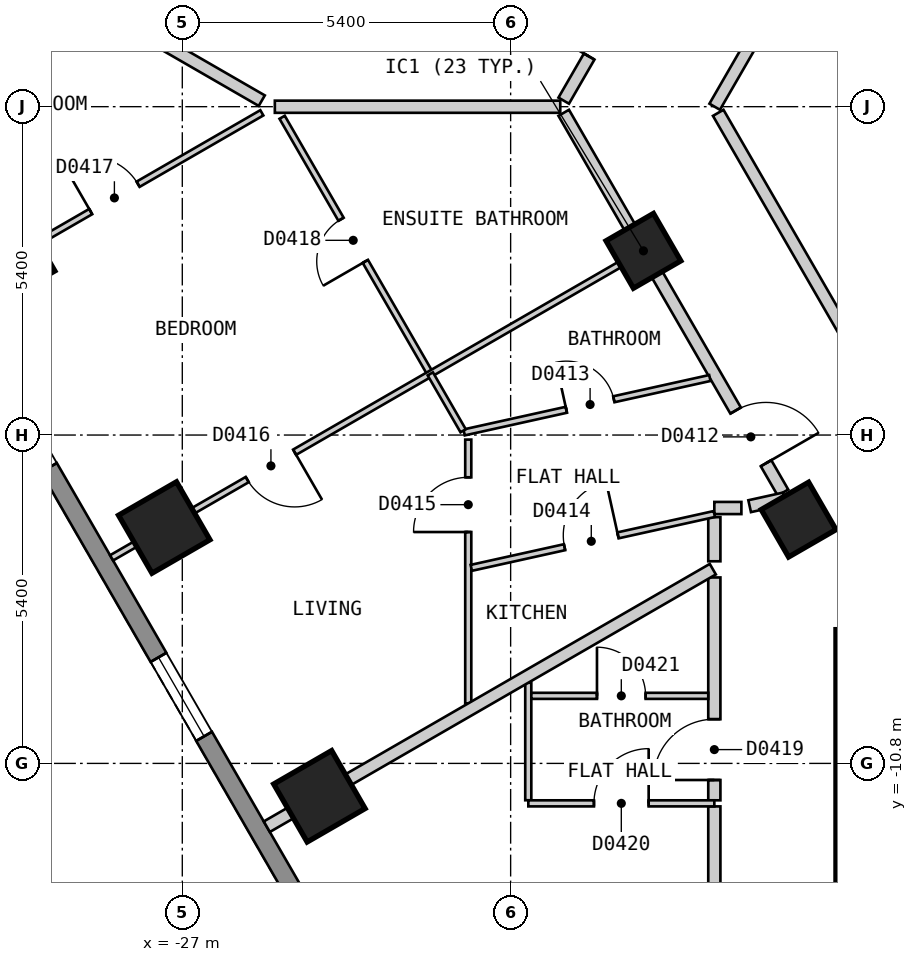
"""IFC4 building model, lengths in metres.
Left out: names, types, materials, properties, quantities, classifications, styles, units other than length and angle.
Written with IfcOpenShell. Run it as: python <this file> out.ifc"""

import sys

from ifc_helpers import new_model, si_unit, direction, frame, frame_2d, origin, origin_2d, place, context, subcontext, project, spatial, polyline, rectangle, outline, extrude, element, fill, save


model = new_model("IFC4")
c1 = context("Model", 3, precision=1e-05, world=origin(), true_north=direction((0.0, 1.0)))
c2 = subcontext(c1, "Body", "Model", "MODEL_VIEW")
j1 = project(units=[si_unit("LENGTHUNIT", "METRE"), si_unit("PLANEANGLEUNIT", "RADIAN")], contexts=[c1])
p1 = place(None, origin())
s1 = spatial("IfcSite", under=j1, at=p1, CompositionType="ELEMENT")
p2 = place(p1, origin())
s2 = spatial("IfcBuilding", under=s1, at=p2, CompositionType="ELEMENT")
p3 = place(p2, frame((0.0, 0.0, 38.4)))
s3 = spatial("IfcBuildingStorey", under=s2, at=p3, CompositionType="ELEMENT", Elevation=38.4)
for number, where, z_axis, x_axis in (
    (1, (-29.848, -2.5, 0.0), (0.0, 0.0, 1.0), (0.5, -0.866, 0.0)),
    (2, (-27.297, -6.921, 0.0), (0.0, 0.0, 1.0), (0.5, -0.866, 0.0)),
    (3, (-24.745, -11.341, 0.0), (0.0, 0.0, 1.0), (0.5, -0.866, 0.0)),
):
    element("IfcColumn", number, at=place(p3, frame(where, z_axis=z_axis, x_axis=x_axis)), inside=s3, PredefinedType="COLUMN", context=c2, shape_type="SweptSolid", body=[
        extrude(rectangle(XDim=1.1, YDim=1.1, at=origin_2d()), origin(), (0.0, 0.0, 1.0), 3.0),
    ])
for number, where, z_axis, x_axis in (
    (4, (-19.416, -2.371, 0.0), (0.0, 0.0, 1.0), (0.5, -0.866, 0.0)),
    (5, (-16.864, -6.791, 0.0), (0.0, 0.0, 1.0), (0.5, -0.866, 0.0)),
):
    element("IfcColumn", number, at=place(p3, frame(where, z_axis=z_axis, x_axis=x_axis)), inside=s3, PredefinedType="COLUMN", context=c2, shape_type="SweptSolid", body=[
        extrude(rectangle(XDim=0.9, YDim=0.9, at=origin_2d()), origin(), (0.0, 0.0, 1.0), 3.0),
    ])
p4 = place(p3, frame((-31.22, -2.425, 0.0), z_axis=(0.0, 0.0, 1.0), x_axis=(0.500001938803, -0.866024284413, 0.0)))
e6 = element("IfcWall", 6, at=p4, inside=s3, PredefinedType="SOLIDWALL", context=c2, shape_type="SweptSolid", body=[
    extrude(outline(polyline([(0.0, -0.15), (27.02, -0.15), (26.94, 0.15), (0.08, 0.15), (0.0, -0.15)])), origin(), (0.0, 0.0, 1.0), 2.7),
])
p5 = place(p4, frame((2.553, 0.0, 0.15)))
e7 = element("IfcOpeningElement", 7, at=p5, cuts=e6, PredefinedType="OPENING", context=c2, shape_type="SweptSolid", body=[
    extrude(rectangle(XDim=1.5, YDim=2.1, at=frame_2d((0.75, 1.05))), frame((0.0, 0.16, 0.0), z_axis=(0.0, -1.0, 0.0), x_axis=(1.0, 0.0, 0.0)), (0.0, 0.0, 1.0), 0.32),
])
p6 = place(p4, frame((7.657, 0.0, 0.15)))
e8 = element("IfcOpeningElement", 8, at=p6, cuts=e6, PredefinedType="OPENING", context=c2, shape_type="SweptSolid", body=[
    extrude(rectangle(XDim=1.5, YDim=2.1, at=frame_2d((0.75, 1.05))), frame((0.0, 0.16, 0.0), z_axis=(0.0, -1.0, 0.0), x_axis=(1.0, 0.0, 0.0)), (0.0, 0.0, 1.0), 0.32),
])
p7 = place(p4, frame((12.761, 0.0, 0.15)))
e9 = element("IfcOpeningElement", 9, at=p7, cuts=e6, PredefinedType="OPENING", context=c2, shape_type="SweptSolid", body=[
    extrude(rectangle(XDim=1.5, YDim=2.1, at=frame_2d((0.75, 1.05))), frame((0.0, 0.16, 0.0), z_axis=(0.0, -1.0, 0.0), x_axis=(1.0, 0.0, 0.0)), (0.0, 0.0, 1.0), 0.32),
])
p8 = place(p4, frame((17.865, 0.0, 0.15)))
e10 = element("IfcOpeningElement", 10, at=p8, cuts=e6, PredefinedType="OPENING", context=c2, shape_type="SweptSolid", body=[
    extrude(rectangle(XDim=1.5, YDim=2.1, at=frame_2d((0.75, 1.05))), frame((0.0, 0.16, 0.0), z_axis=(0.0, -1.0, 0.0), x_axis=(1.0, 0.0, 0.0)), (0.0, 0.0, 1.0), 0.32),
])
p9 = place(p4, frame((22.969, 0.0, 0.15)))
e11 = element("IfcOpeningElement", 11, at=p9, cuts=e6, PredefinedType="OPENING", context=c2, shape_type="SweptSolid", body=[
    extrude(rectangle(XDim=1.5, YDim=2.1, at=frame_2d((0.75, 1.05))), frame((0.0, 0.16, 0.0), z_axis=(0.0, -1.0, 0.0), x_axis=(1.0, 0.0, 0.0)), (0.0, 0.0, 1.0), 0.32),
])
p10 = place(p3, frame((-18.186, -0.101, 0.0), z_axis=(0.0, 0.0, 1.0), x_axis=(0.499997591167, -0.86602679452, 0.0)))
e12 = element("IfcWall", 12, at=p10, inside=s3, PredefinedType="PARTITIONING", context=c2, shape_type="SweptSolid", body=[
    extrude(rectangle(XDim=5.172, YDim=0.2, at=frame_2d((2.586, 0.0))), origin(), (0.0, 0.0, 1.0), 2.7),
])
p11 = place(p3, frame((-20.727, -0.101, 0.0), z_axis=(0.0, 0.0, 1.0), x_axis=(0.500049702773, -0.865996705973, 0.0)))
e13 = element("IfcWall", 13, at=p11, inside=s3, PredefinedType="PARTITIONING", context=c2, shape_type="SweptSolid", body=[
    extrude(rectangle(XDim=7.211, YDim=0.2, at=frame_2d((3.605, 0.0))), origin(), (0.0, 0.0, 1.0), 2.7),
])
p12 = place(p11, frame((5.654, 0.0, 0.0)))
e14 = element("IfcOpeningElement", 14, at=p12, cuts=e13, PredefinedType="OPENING", context=c2, shape_type="SweptSolid", body=[
    extrude(rectangle(XDim=1.0, YDim=2.1, at=frame_2d((0.5, 1.05))), frame((0.0, 0.11, 0.0), z_axis=(0.0, -1.0, 0.0), x_axis=(1.0, 0.0, 0.0)), (0.0, 0.0, 1.0), 0.22),
])
p13 = place(p3, frame((-18.25, -11.507, 0.0), z_axis=(0.0, 0.0, 1.0), x_axis=(0.0, -1.0, 0.0)))
e15 = element("IfcWall", 15, at=p13, inside=s3, PredefinedType="PARTITIONING", context=c2, shape_type="SweptSolid", body=[
    extrude(rectangle(XDim=4.792, YDim=0.2, at=frame_2d((2.396, 0.0))), origin(), (0.0, 0.0, 1.0), 2.7),
])
p14 = place(p3, frame((-18.25, -6.6, 0.0), z_axis=(0.0, 0.0, 1.0), x_axis=(1.0, 0.0, 0.0)))
e16 = element("IfcWall", 16, at=p14, inside=s3, PredefinedType="PARTITIONING", context=c2, shape_type="SweptSolid", body=[
    extrude(rectangle(XDim=0.445, YDim=0.2, at=frame_2d((0.223, 0.0))), origin(), (0.0, 0.0, 1.0), 2.7),
])
p15 = place(p3, frame((-18.244, -0.001, 0.0), z_axis=(0.0, 0.0, 1.0), x_axis=(0.499962999376, 0.866046765051, 0.0)))
e17 = element("IfcWall", 17, at=p15, inside=s3, PredefinedType="PARTITIONING", context=c2, shape_type="SweptSolid", body=[
    extrude(rectangle(XDim=18.245, YDim=0.2, at=frame_2d((9.123, 0.0))), origin(), (0.0, 0.0, 1.0), 2.7),
])
p16 = place(p15, frame((8.672, 0.0, 0.0)))
e18 = element("IfcOpeningElement", 18, at=p16, cuts=e17, PredefinedType="OPENING", context=c2, shape_type="SweptSolid", body=[
    extrude(rectangle(XDim=0.9, YDim=2.1, at=frame_2d((0.45, 1.05))), frame((0.0, 0.11, 0.0), z_axis=(0.0, -1.0, 0.0), x_axis=(1.0, 0.0, 0.0)), (0.0, 0.0, 1.0), 0.22),
])
p17 = place(p3, frame((-20.727, 0.099, 0.0), z_axis=(0.0, 0.0, 1.0), x_axis=(0.499993204491, 0.866029327138, 0.0)))
e19 = element("IfcWall", 19, at=p17, inside=s3, PredefinedType="PARTITIONING", context=c2, shape_type="SweptSolid", body=[
    extrude(rectangle(XDim=20.554, YDim=0.2, at=frame_2d((10.277, 0.0))), origin(), (0.0, 0.0, 1.0), 2.7),
])
p18 = place(p17, frame((18.916, 0.0, 0.0)))
e20 = element("IfcOpeningElement", 20, at=p18, cuts=e19, PredefinedType="OPENING", context=c2, shape_type="SweptSolid", body=[
    extrude(rectangle(XDim=0.8, YDim=2.1, at=frame_2d((0.4, 1.05))), frame((0.0, 0.11, 0.0), z_axis=(0.0, -1.0, 0.0), x_axis=(1.0, 0.0, 0.0)), (0.0, 0.0, 1.0), 0.22),
])
p19 = place(p17, frame((14.88, 0.0, 0.0)))
e21 = element("IfcOpeningElement", 21, at=p19, cuts=e19, PredefinedType="OPENING", context=c2, shape_type="SweptSolid", body=[
    extrude(rectangle(XDim=1.0, YDim=2.1, at=frame_2d((0.5, 1.05))), frame((0.0, 0.11, 0.0), z_axis=(0.0, -1.0, 0.0), x_axis=(1.0, 0.0, 0.0)), (0.0, 0.0, 1.0), 0.22),
])
p20 = place(p17, frame((9.776, 0.0, 0.0)))
e22 = element("IfcOpeningElement", 22, at=p20, cuts=e19, PredefinedType="OPENING", context=c2, shape_type="SweptSolid", body=[
    extrude(rectangle(XDim=1.0, YDim=2.1, at=frame_2d((0.5, 1.05))), frame((0.0, 0.11, 0.0), z_axis=(0.0, -1.0, 0.0), x_axis=(1.0, 0.0, 0.0)), (0.0, 0.0, 1.0), 0.22),
])
p21 = place(p17, frame((4.673, 0.0, 0.0)))
e23 = element("IfcOpeningElement", 23, at=p21, cuts=e19, PredefinedType="OPENING", context=c2, shape_type="SweptSolid", body=[
    extrude(rectangle(XDim=1.0, YDim=2.1, at=frame_2d((0.5, 1.05))), frame((0.0, 0.11, 0.0), z_axis=(0.0, -1.0, 0.0), x_axis=(1.0, 0.0, 0.0)), (0.0, 0.0, 1.0), 0.22),
])
p22 = place(p17, frame((0.838, 0.0, 0.0)))
e24 = element("IfcOpeningElement", 24, at=p22, cuts=e19, PredefinedType="OPENING", context=c2, shape_type="SweptSolid", body=[
    extrude(rectangle(XDim=0.8, YDim=2.1, at=frame_2d((0.4, 1.05))), frame((0.0, 0.11, 0.0), z_axis=(0.0, -1.0, 0.0), x_axis=(1.0, 0.0, 0.0)), (0.0, 0.0, 1.0), 0.22),
])
p23 = place(p3, frame((-18.25, -11.407, 0.0), z_axis=(0.0, 0.0, 1.0), x_axis=(0.0, 1.0, 0.0)))
e25 = element("IfcWall", 25, at=p23, inside=s3, PredefinedType="PARTITIONING", context=c2, shape_type="SweptSolid", body=[
    extrude(rectangle(XDim=3.665, YDim=0.2, at=frame_2d((1.833, 0.0))), origin(), (0.0, 0.0, 1.0), 2.7),
])
p24 = place(p23, frame((0.334, 0.0, 0.0)))
e26 = element("IfcOpeningElement", 26, at=p24, cuts=e25, PredefinedType="OPENING", context=c2, shape_type="SweptSolid", body=[
    extrude(rectangle(XDim=1.0, YDim=2.1, at=frame_2d((0.5, 1.05))), frame((0.0, 0.11, 0.0), z_axis=(0.0, -1.0, 0.0), x_axis=(1.0, 0.0, 0.0)), (0.0, 0.0, 1.0), 0.22),
])
p25 = place(p3, frame((-18.25, -7.476, 0.0), z_axis=(0.0, 0.0, 1.0), x_axis=(0.0, 1.0, 0.0)))
e27 = element("IfcWall", 27, at=p25, inside=s3, PredefinedType="PARTITIONING", context=c2, shape_type="SweptSolid", body=[
    extrude(rectangle(XDim=0.726, YDim=0.2, at=frame_2d((0.363, 0.0))), origin(), (0.0, 0.0, 1.0), 2.7),
])
p26 = place(p3, frame((-25.358, -0.174, 0.0), z_axis=(0.0, 0.0, 1.0), x_axis=(0.500093956194, -0.865971151354, 0.0)))
e28 = element("IfcWall", 28, at=p26, inside=s3, PredefinedType="PARTITIONING", context=c2, shape_type="SweptSolid", body=[
    extrude(rectangle(XDim=4.873, YDim=0.1, at=frame_2d((2.437, 0.0))), origin(), (0.0, 0.0, 1.0), 2.7),
])
p27 = place(p26, frame((1.937, 0.0, 0.0)))
e29 = element("IfcOpeningElement", 29, at=p27, cuts=e28, PredefinedType="OPENING", context=c2, shape_type="SweptSolid", body=[
    extrude(rectangle(XDim=0.8, YDim=2.1, at=frame_2d((0.4, 1.05))), frame((0.0, 0.06, 0.0), z_axis=(0.0, -1.0, 0.0), x_axis=(1.0, 0.0, 0.0)), (0.0, 0.0, 1.0), 0.12),
])
p28 = place(p3, frame((-21.31, -9.474, 0.0), z_axis=(0.0, 0.0, 1.0), x_axis=(0.0, -1.0, 0.0)))
e30 = element("IfcWall", 30, at=p28, inside=s3, PredefinedType="PARTITIONING", context=c2, shape_type="SweptSolid", body=[
    extrude(rectangle(XDim=1.932, YDim=0.1, at=frame_2d((0.966, 0.0))), origin(), (0.0, 0.0, 1.0), 2.7),
])
p29 = place(p3, frame((-21.26, -9.689, 0.0), z_axis=(0.0, 0.0, 1.0), x_axis=(1.0, 0.0, 0.0)))
e31 = element("IfcWall", 31, at=p29, inside=s3, PredefinedType="PARTITIONING", context=c2, shape_type="SweptSolid", body=[
    extrude(rectangle(XDim=2.91, YDim=0.1, at=frame_2d((1.455, 0.0))), origin(), (0.0, 0.0, 1.0), 2.7),
])
p30 = place(p29, frame((1.08, 0.0, 0.0)))
e32 = element("IfcOpeningElement", 32, at=p30, cuts=e31, PredefinedType="OPENING", context=c2, shape_type="SweptSolid", body=[
    extrude(rectangle(XDim=0.8, YDim=2.1, at=frame_2d((0.4, 1.05))), frame((0.0, 0.06, 0.0), z_axis=(0.0, -1.0, 0.0), x_axis=(1.0, 0.0, 0.0)), (0.0, 0.0, 1.0), 0.12),
])
p31 = place(p3, frame((-21.309, -11.457, 0.0), z_axis=(0.0, 0.0, 1.0), x_axis=(1.0, 0.0, 0.0)))
e33 = element("IfcWall", 33, at=p31, inside=s3, PredefinedType="PARTITIONING", context=c2, shape_type="SweptSolid", body=[
    extrude(rectangle(XDim=3.059, YDim=0.1, at=frame_2d((1.53, 0.0))), origin(), (0.0, 0.0, 1.0), 2.7),
])
p32 = place(p31, frame((1.079, 0.0, 0.0)))
e34 = element("IfcOpeningElement", 34, at=p32, cuts=e33, PredefinedType="OPENING", context=c2, shape_type="SweptSolid", body=[
    extrude(rectangle(XDim=0.9, YDim=2.1, at=frame_2d((0.45, 1.05))), frame((0.0, 0.06, 0.0), z_axis=(0.0, -1.0, 0.0), x_axis=(1.0, 0.0, 0.0)), (0.0, 0.0, 1.0), 0.12),
])
p33 = place(p3, frame((-22.297, -9.813, 0.0), z_axis=(0.0, 0.0, 1.0), x_axis=(0.0, 1.0, 0.0)))
e35 = element("IfcWall", 35, at=p33, inside=s3, PredefinedType="PARTITIONING", context=c2, shape_type="SweptSolid", body=[
    extrude(rectangle(XDim=4.338, YDim=0.1, at=frame_2d((2.169, 0.0))), origin(), (0.0, 0.0, 1.0), 2.7),
])
p34 = place(p33, frame((2.818, 0.0, 0.0)))
e36 = element("IfcOpeningElement", 36, at=p34, cuts=e35, PredefinedType="OPENING", context=c2, shape_type="SweptSolid", body=[
    extrude(rectangle(XDim=0.9, YDim=2.1, at=frame_2d((0.45, 1.05))), frame((0.0, 0.06, 0.0), z_axis=(0.0, -1.0, 0.0), x_axis=(1.0, 0.0, 0.0)), (0.0, 0.0, 1.0), 0.12),
])
p35 = place(p3, frame((-22.365, -5.357, 0.0), z_axis=(0.0, 0.0, 1.0), x_axis=(0.976339488582, 0.216243388421, 0.0)))
e37 = element("IfcWall", 37, at=p35, inside=s3, PredefinedType="PARTITIONING", context=c2, shape_type="SweptSolid", body=[
    extrude(rectangle(XDim=4.139, YDim=0.1, at=frame_2d((2.069, 0.0))), origin(), (0.0, 0.0, 1.0), 2.7),
])
p36 = place(p35, frame((1.722, 0.0, 0.0)))
e38 = element("IfcOpeningElement", 38, at=p36, cuts=e37, PredefinedType="OPENING", context=c2, shape_type="SweptSolid", body=[
    extrude(rectangle(XDim=0.8, YDim=2.1, at=frame_2d((0.4, 1.05))), frame((0.0, 0.06, 0.0), z_axis=(0.0, -1.0, 0.0), x_axis=(1.0, 0.0, 0.0)), (0.0, 0.0, 1.0), 0.12),
])
p37 = place(p3, frame((-22.247, -7.584, 0.0), z_axis=(0.0, 0.0, 1.0), x_axis=(0.97635375062, 0.216178985219, 0.0)))
e39 = element("IfcWall", 39, at=p37, inside=s3, PredefinedType="PARTITIONING", context=c2, shape_type="SweptSolid", body=[
    extrude(rectangle(XDim=4.094, YDim=0.1, at=frame_2d((2.047, 0.0))), origin(), (0.0, 0.0, 1.0), 2.7),
])
p38 = place(p37, frame((1.571, 0.0, 0.0)))
e40 = element("IfcOpeningElement", 40, at=p38, cuts=e39, PredefinedType="OPENING", context=c2, shape_type="SweptSolid", body=[
    extrude(rectangle(XDim=0.9, YDim=2.1, at=frame_2d((0.45, 1.05))), frame((0.0, 0.06, 0.0), z_axis=(0.0, -1.0, 0.0), x_axis=(1.0, 0.0, 0.0)), (0.0, 0.0, 1.0), 0.12),
])
p39 = place(p3, frame((-28.163, -7.42, 0.0), z_axis=(0.0, 0.0, 1.0), x_axis=(0.866065245018, 0.499930986609, 0.0)))
e41 = element("IfcWall", 41, at=p39, inside=s3, PredefinedType="PARTITIONING", context=c2, shape_type="SweptSolid", body=[
    extrude(rectangle(XDim=10.0, YDim=0.1, at=frame_2d((5.0, 0.0))), origin(), (0.0, 0.0, 1.0), 2.7),
])
p40 = place(p39, frame((2.576, 0.0, 0.0)))
e42 = element("IfcOpeningElement", 42, at=p40, cuts=e41, PredefinedType="OPENING", context=c2, shape_type="SweptSolid", body=[
    extrude(rectangle(XDim=0.9, YDim=2.1, at=frame_2d((0.45, 1.05))), frame((0.0, 0.06, 0.0), z_axis=(0.0, -1.0, 0.0), x_axis=(1.0, 0.0, 0.0)), (0.0, 0.0, 1.0), 0.12),
])
p41 = place(p3, frame((-30.715, -3.0, 0.0), z_axis=(0.0, 0.0, 1.0), x_axis=(0.866116197112, 0.49984270836, 0.0)))
e43 = element("IfcWall", 43, at=p41, inside=s3, PredefinedType="PARTITIONING", context=c2, shape_type="SweptSolid", body=[
    extrude(rectangle(XDim=5.8, YDim=0.1, at=frame_2d((2.9, 0.0))), origin(), (0.0, 0.0, 1.0), 2.7),
])
p42 = place(p41, frame((2.55, 0.0, 0.0)))
e44 = element("IfcOpeningElement", 44, at=p42, cuts=e43, PredefinedType="OPENING", context=c2, shape_type="SweptSolid", body=[
    extrude(rectangle(XDim=0.9, YDim=2.1, at=frame_2d((0.45, 1.05))), frame((0.0, 0.06, 0.0), z_axis=(0.0, -1.0, 0.0), x_axis=(1.0, 0.0, 0.0)), (0.0, 0.0, 1.0), 0.12),
])
p43 = place(p3, frame((-30.716, 2.999, 0.0), z_axis=(0.0, 0.0, 1.0), x_axis=(0.866032775405, -0.499987231761, 0.0)))
e45 = element("IfcWall", 45, at=p43, inside=s3, PredefinedType="PARTITIONING", context=c2, shape_type="SweptSolid", body=[
    extrude(rectangle(XDim=5.8, YDim=0.2, at=frame_2d((2.9, 0.0))), origin(), (0.0, 0.0, 1.0), 2.7),
])
p44 = place(p3, frame((-25.478, -0.001, 0.0), z_axis=(0.0, 0.0, 1.0), x_axis=(1.0, 0.0, 0.0)))
e46 = element("IfcWall", 46, at=p44, inside=s3, PredefinedType="PARTITIONING", context=c2, shape_type="SweptSolid", body=[
    extrude(rectangle(XDim=4.694, YDim=0.2, at=frame_2d((2.347, 0.0))), origin(), (0.0, 0.0, 1.0), 2.7),
])
p45 = place(p3, frame((-17.669, -6.57, 0.0), z_axis=(0.0, 0.0, 1.0), x_axis=(0.976422724526, 0.215867234728, 0.0)))
e47 = element("IfcWall", 47, at=p45, inside=s3, PredefinedType="PARTITIONING", context=c2, shape_type="SweptSolid", body=[
    extrude(rectangle(XDim=0.583, YDim=0.2, at=frame_2d((0.292, 0.0))), origin(), (0.0, 0.0, 1.0), 2.7),
])
p46 = place(p3, frame((-25.61, -11.841, 0.0), z_axis=(0.0, 0.0, 1.0), x_axis=(0.866019023803, 0.500011050288, 0.0)))
e48 = element("IfcWall", 48, at=p46, inside=s3, PredefinedType="PARTITIONING", context=c2, shape_type="SweptSolid", body=[
    extrude(rectangle(XDim=8.47, YDim=0.2, at=frame_2d((4.235, 0.0))), origin(), (0.0, 0.0, 1.0), 2.7),
])
p47 = place(p3, frame((-22.921, -4.394, 0.0), z_axis=(0.0, 0.0, 1.0), x_axis=(0.499565963512, -0.866275849889, 0.0)))
e49 = element("IfcWall", 49, at=p47, inside=s3, PredefinedType="PARTITIONING", context=c2, shape_type="SweptSolid", body=[
    extrude(rectangle(XDim=1.081, YDim=0.1, at=frame_2d((0.54, 0.0))), origin(), (0.0, 0.0, 1.0), 2.7),
])
p48 = place(p3, frame((-16.15, -14.4, 0.0), z_axis=(0.0, 0.0, 1.0), x_axis=(0.0, 1.0, 0.0)))
e50 = element("IfcWall", 50, at=p48, inside=s3, PredefinedType="SOLIDWALL", context=c2, shape_type="SweptSolid", body=[
    extrude(rectangle(XDim=5.8, YDim=0.2, at=frame_2d((2.9, 0.0))), origin(), (0.0, 0.0, 1.0), 2.7),
])
p49 = place(p6, origin())
e51 = element("IfcWindow", 51, at=p49, inside=s3, PartitioningType="SINGLE_PANEL", PredefinedType="WINDOW", context=c2, shape_type="SweptSolid", body=[
    extrude(rectangle(XDim=1.5, YDim=2.1, at=frame_2d((0.75, 1.05))), frame((0.0, 0.03, 0.0), z_axis=(0.0, -1.0, 0.0), x_axis=(1.0, 0.0, 0.0)), (0.0, 0.0, 1.0), 0.06),
])
fill(e8, e51)
p50 = place(p22, origin())
e52 = element("IfcDoor", 52, at=p50, inside=s3, OperationType="SINGLE_SWING_LEFT", PredefinedType="DOOR", context=c2, shape_type="SweptSolid", body=[
    extrude(rectangle(XDim=0.8, YDim=2.1, at=frame_2d((0.4, 1.05))), frame((0.0, 0.025, 0.0), z_axis=(0.0, -1.0, 0.0), x_axis=(1.0, 0.0, 0.0)), (0.0, 0.0, 1.0), 0.05),
])
fill(e24, e52)
p51 = place(p12, origin())
e53 = element("IfcDoor", 53, at=p51, inside=s3, OperationType="SINGLE_SWING_RIGHT", PredefinedType="DOOR", context=c2, shape_type="SweptSolid", body=[
    extrude(rectangle(XDim=1.0, YDim=2.1, at=frame_2d((0.5, 1.05))), frame((0.0, 0.025, 0.0), z_axis=(0.0, -1.0, 0.0), x_axis=(1.0, 0.0, 0.0)), (0.0, 0.0, 1.0), 0.05),
])
fill(e14, e53)
p52 = place(p36, origin())
e54 = element("IfcDoor", 54, at=p52, inside=s3, OperationType="SINGLE_SWING_LEFT", PredefinedType="DOOR", context=c2, shape_type="SweptSolid", body=[
    extrude(rectangle(XDim=0.8, YDim=2.1, at=frame_2d((0.4, 1.05))), frame((0.0, 0.025, 0.0), z_axis=(0.0, -1.0, 0.0), x_axis=(1.0, 0.0, 0.0)), (0.0, 0.0, 1.0), 0.05),
])
fill(e38, e54)
p53 = place(p38, origin())
e55 = element("IfcDoor", 55, at=p53, inside=s3, OperationType="SINGLE_SWING_RIGHT", PredefinedType="DOOR", context=c2, shape_type="SweptSolid", body=[
    extrude(rectangle(XDim=0.9, YDim=2.1, at=frame_2d((0.45, 1.05))), frame((0.0, 0.025, 0.0), z_axis=(0.0, -1.0, 0.0), x_axis=(1.0, 0.0, 0.0)), (0.0, 0.0, 1.0), 0.05),
])
fill(e40, e55)
p54 = place(p34, origin())
e56 = element("IfcDoor", 56, at=p54, inside=s3, OperationType="SINGLE_SWING_LEFT", PredefinedType="DOOR", context=c2, shape_type="SweptSolid", body=[
    extrude(rectangle(XDim=0.9, YDim=2.1, at=frame_2d((0.45, 1.05))), frame((0.0, 0.025, 0.0), z_axis=(0.0, -1.0, 0.0), x_axis=(1.0, 0.0, 0.0)), (0.0, 0.0, 1.0), 0.05),
])
fill(e36, e56)
p55 = place(p40, origin())
e57 = element("IfcDoor", 57, at=p55, inside=s3, OperationType="SINGLE_SWING_RIGHT", PredefinedType="DOOR", context=c2, shape_type="SweptSolid", body=[
    extrude(rectangle(XDim=0.9, YDim=2.1, at=frame_2d((0.45, 1.05))), frame((0.0, 0.025, 0.0), z_axis=(0.0, -1.0, 0.0), x_axis=(1.0, 0.0, 0.0)), (0.0, 0.0, 1.0), 0.05),
])
fill(e42, e57)
p56 = place(p42, origin())
e58 = element("IfcDoor", 58, at=p56, inside=s3, OperationType="SINGLE_SWING_LEFT", PredefinedType="DOOR", context=c2, shape_type="SweptSolid", body=[
    extrude(rectangle(XDim=0.9, YDim=2.1, at=frame_2d((0.45, 1.05))), frame((0.0, 0.025, 0.0), z_axis=(0.0, -1.0, 0.0), x_axis=(1.0, 0.0, 0.0)), (0.0, 0.0, 1.0), 0.05),
])
fill(e44, e58)
p57 = place(p27, origin())
e59 = element("IfcDoor", 59, at=p57, inside=s3, OperationType="SINGLE_SWING_RIGHT", PredefinedType="DOOR", context=c2, shape_type="SweptSolid", body=[
    extrude(rectangle(XDim=0.8, YDim=2.1, at=frame_2d((0.4, 1.05))), frame((0.0, 0.025, 0.0), z_axis=(0.0, -1.0, 0.0), x_axis=(1.0, 0.0, 0.0)), (0.0, 0.0, 1.0), 0.05),
])
fill(e29, e59)
p58 = place(p24, origin())
e60 = element("IfcDoor", 60, at=p58, inside=s3, OperationType="SINGLE_SWING_LEFT", PredefinedType="DOOR", context=c2, shape_type="SweptSolid", body=[
    extrude(rectangle(XDim=1.0, YDim=2.1, at=frame_2d((0.5, 1.05))), frame((0.0, 0.025, 0.0), z_axis=(0.0, -1.0, 0.0), x_axis=(1.0, 0.0, 0.0)), (0.0, 0.0, 1.0), 0.05),
])
fill(e26, e60)
p59 = place(p32, origin())
e61 = element("IfcDoor", 61, at=p59, inside=s3, OperationType="SINGLE_SWING_RIGHT", PredefinedType="DOOR", context=c2, shape_type="SweptSolid", body=[
    extrude(rectangle(XDim=0.9, YDim=2.1, at=frame_2d((0.45, 1.05))), frame((0.0, 0.025, 0.0), z_axis=(0.0, -1.0, 0.0), x_axis=(1.0, 0.0, 0.0)), (0.0, 0.0, 1.0), 0.05),
])
fill(e34, e61)
p60 = place(p30, origin())
e62 = element("IfcDoor", 62, at=p60, inside=s3, OperationType="SINGLE_SWING_LEFT", PredefinedType="DOOR", context=c2, shape_type="SweptSolid", body=[
    extrude(rectangle(XDim=0.8, YDim=2.1, at=frame_2d((0.4, 1.05))), frame((0.0, 0.025, 0.0), z_axis=(0.0, -1.0, 0.0), x_axis=(1.0, 0.0, 0.0)), (0.0, 0.0, 1.0), 0.05),
])
fill(e32, e62)
save(model, sys.argv[1])
